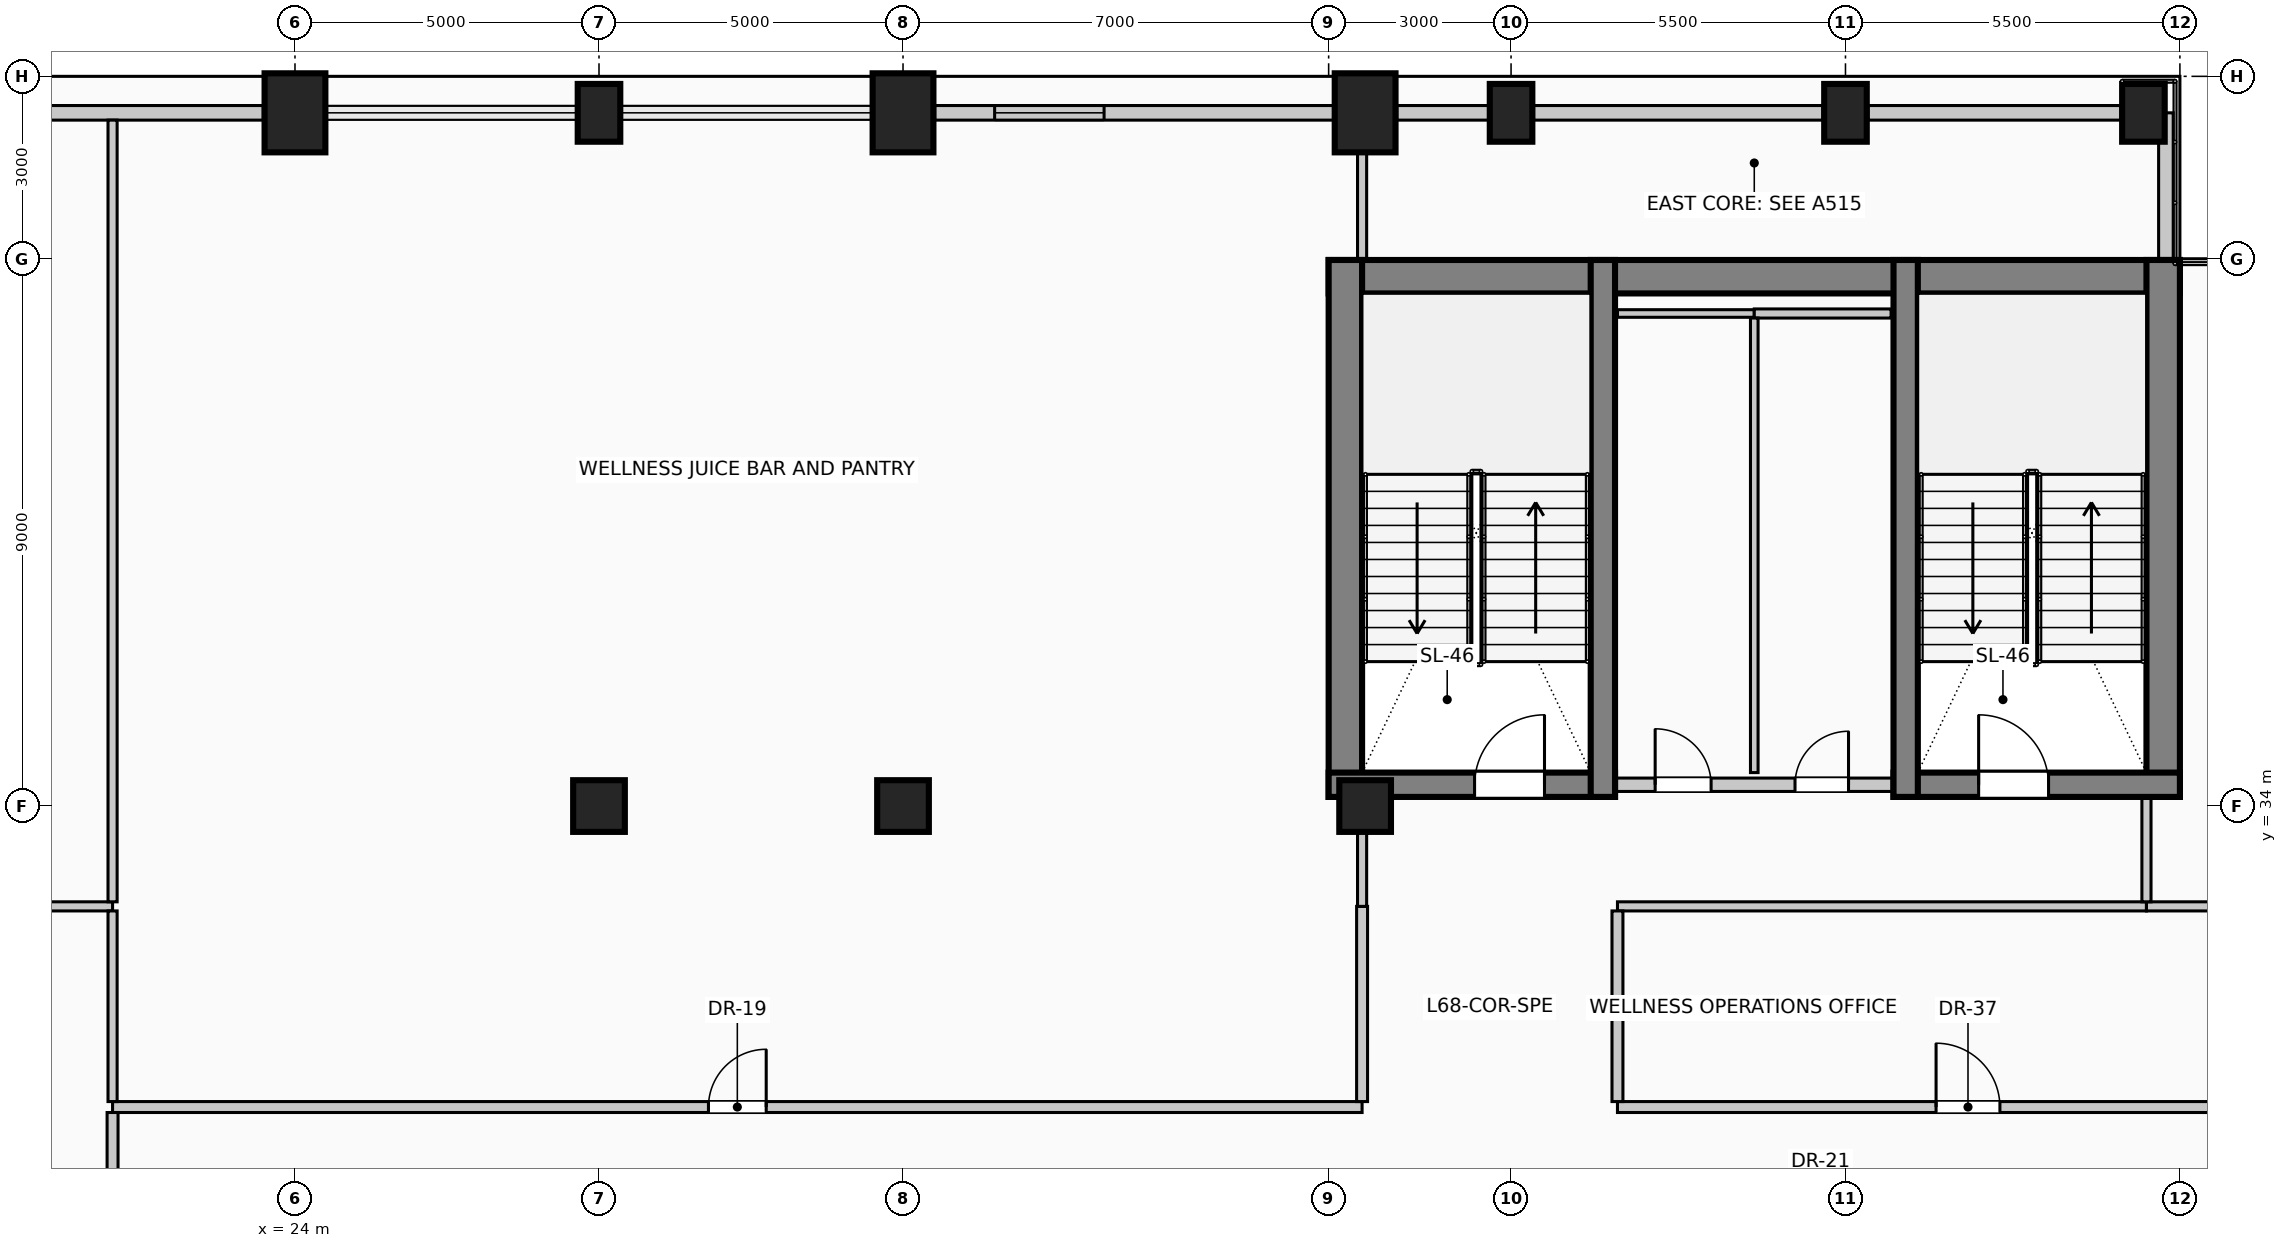
"""IFC4 building model, lengths in metres.
Left out: names, types, materials, properties, quantities, classifications, styles, units other than length and angle.
Written with IfcOpenShell. Run it as: python <this file> out.ifc"""

import sys

from ifc_helpers import new_model, si_unit, direction, frame, frame_2d, origin, origin_2d, place, context, subcontext, project, spatial, rectangle, circle, extrude, element, fill, save


model = new_model("IFC4")
c1 = context("Model", 3, precision=1e-05, world=origin(), true_north=direction((0.0, 1.0)))
c2 = subcontext(c1, "Body", "Model", "MODEL_VIEW")
j1 = project(units=[si_unit("LENGTHUNIT", "METRE"), si_unit("PLANEANGLEUNIT", "RADIAN")], contexts=[c1])
p1 = place(None, origin())
s1 = spatial("IfcSite", under=j1, at=p1, CompositionType="ELEMENT")
p2 = place(p1, origin())
s2 = spatial("IfcBuilding", under=s1, at=p2, CompositionType="ELEMENT")
p3 = place(p2, frame((0.0, 0.0, 280.6)))
s3 = spatial("IfcBuildingStorey", under=s2, at=p3, CompositionType="ELEMENT", Elevation=280.6)
p4 = place(p3, frame((41.0, 42.705, 0.0), z_axis=(0.0, 0.0, 1.0), x_axis=(1.0, 0.0, 0.0)))
e1 = element("IfcWall", 1, at=p4, inside=s3, PredefinedType="SHEAR", context=c2, shape_type="SweptSolid", body=[
    extrude(rectangle(XDim=14.0, YDim=0.55, at=frame_2d((7.0, 0.0))), origin(), (0.0, 0.0, 1.0), 4.4),
])
for number, where, z_axis, x_axis in (
    (2, (41.275, 34.15, 0.0), (0.0, 0.0, 1.0), (0.0, 1.0, 0.0)),
    (3, (54.725, 34.15, 0.0), (0.0, 0.0, 1.0), (0.0, 1.0, 0.0)),
):
    element("IfcWall", number, at=place(p3, frame(where, z_axis=z_axis, x_axis=x_axis)), inside=s3, PredefinedType="SHEAR", context=c2, shape_type="SweptSolid", body=[
        extrude(rectangle(XDim=8.83, YDim=0.55, at=frame_2d((4.415, 0.0))), origin(), (0.0, 0.0, 1.0), 4.4),
    ])
p5 = place(p3, frame((41.0, 34.35, 0.0), z_axis=(0.0, 0.0, 1.0), x_axis=(1.0, 0.0, 0.0)))
e4 = element("IfcWall", 4, at=p5, inside=s3, PredefinedType="SHEAR", context=c2, shape_type="SweptSolid", body=[
    extrude(rectangle(XDim=4.71, YDim=0.4, at=frame_2d((2.355, 0.0))), origin(), (0.0, 0.0, 1.0), 4.4),
])
p6 = place(p5, frame((2.4, 0.0, 0.0)))
e5 = element("IfcOpeningElement", 5, at=p6, cuts=e4, PredefinedType="OPENING", context=c2, shape_type="SweptSolid", body=[
    extrude(rectangle(XDim=1.15, YDim=2.2, at=frame_2d((0.575, 1.1))), frame((0.0, 0.21, 0.0), z_axis=(0.0, -1.0, 0.0), x_axis=(1.0, 0.0, 0.0)), (0.0, 0.0, 1.0), 0.42),
])
p7 = place(p3, frame((45.51, 34.15, 0.0), z_axis=(0.0, 0.0, 1.0), x_axis=(0.0, 1.0, 0.0)))
e6 = element("IfcWall", 6, at=p7, inside=s3, PredefinedType="SHEAR", context=c2, shape_type="SweptSolid", body=[
    extrude(rectangle(XDim=8.83, YDim=0.4, at=frame_2d((4.415, 0.0))), origin(), (0.0, 0.0, 1.0), 4.4),
])
p8 = place(p3, frame((50.29, 34.35, 0.0), z_axis=(0.0, 0.0, 1.0), x_axis=(1.0, 0.0, 0.0)))
e7 = element("IfcWall", 7, at=p8, inside=s3, PredefinedType="SHEAR", context=c2, shape_type="SweptSolid", body=[
    extrude(rectangle(XDim=4.71, YDim=0.4, at=frame_2d((2.355, 0.0))), origin(), (0.0, 0.0, 1.0), 4.4),
])
p9 = place(p8, frame((1.4, 0.0, 0.0)))
e8 = element("IfcOpeningElement", 8, at=p9, cuts=e7, PredefinedType="OPENING", context=c2, shape_type="SweptSolid", body=[
    extrude(rectangle(XDim=1.15, YDim=2.2, at=frame_2d((0.575, 1.1))), frame((0.0, 0.21, 0.0), z_axis=(0.0, -1.0, 0.0), x_axis=(1.0, 0.0, 0.0)), (0.0, 0.0, 1.0), 0.42),
])
p10 = place(p3, frame((50.49, 34.15, 0.0), z_axis=(0.0, 0.0, 1.0), x_axis=(0.0, 1.0, 0.0)))
e9 = element("IfcWall", 9, at=p10, inside=s3, PredefinedType="SHEAR", context=c2, shape_type="SweptSolid", body=[
    extrude(rectangle(XDim=8.83, YDim=0.4, at=frame_2d((4.415, 0.0))), origin(), (0.0, 0.0, 1.0), 4.4),
])
p11 = place(p3, frame((24.0, 45.4, 0.0), z_axis=(0.0, 0.0, 1.0), x_axis=(1.0, 0.0, 0.0)))
e10 = element("IfcColumn", 10, at=p11, inside=s3, PredefinedType="COLUMN", context=c2, shape_type="SweptSolid", body=[
    extrude(rectangle(XDim=1.0, YDim=1.3, at=origin_2d()), origin(), (0.0, 0.0, 1.0), 4.4),
])
p12 = place(p3, frame((29.0, 45.4, 0.0), z_axis=(0.0, 0.0, 1.0), x_axis=(1.0, 0.0, 0.0)))
e11 = element("IfcColumn", 11, at=p12, inside=s3, PredefinedType="COLUMN", context=c2, shape_type="SweptSolid", body=[
    extrude(rectangle(XDim=0.7, YDim=0.95, at=origin_2d()), origin(), (0.0, 0.0, 1.0), 4.4),
])
for number, where, z_axis, x_axis in (
    (12, (34.0, 45.4, 0.0), (0.0, 0.0, 1.0), (1.0, 0.0, 0.0)),
    (13, (41.6, 45.4, 0.0), (0.0, 0.0, 1.0), (1.0, 0.0, 0.0)),
):
    element("IfcColumn", number, at=place(p3, frame(where, z_axis=z_axis, x_axis=x_axis)), inside=s3, PredefinedType="COLUMN", context=c2, shape_type="SweptSolid", body=[
        extrude(rectangle(XDim=1.0, YDim=1.3, at=origin_2d()), origin(), (0.0, 0.0, 1.0), 4.4),
    ])
for number, where, z_axis, x_axis in (
    (14, (44.0, 45.4, 0.0), (0.0, 0.0, 1.0), (1.0, 0.0, 0.0)),
    (15, (49.5, 45.4, 0.0), (0.0, 0.0, 1.0), (1.0, 0.0, 0.0)),
    (16, (54.4, 45.4, 0.0), (0.0, 0.0, 1.0), (1.0, 0.0, 0.0)),
):
    element("IfcColumn", number, at=place(p3, frame(where, z_axis=z_axis, x_axis=x_axis)), inside=s3, PredefinedType="COLUMN", context=c2, shape_type="SweptSolid", body=[
        extrude(rectangle(XDim=0.7, YDim=0.95, at=origin_2d()), origin(), (0.0, 0.0, 1.0), 4.4),
    ])
for number, where, z_axis, x_axis in (
    (17, (29.0, 34.0, 0.0), (0.0, 0.0, 1.0), (1.0, 0.0, 0.0)),
    (18, (41.6, 34.0, 0.0), (0.0, 0.0, 1.0), (1.0, 0.0, 0.0)),
    (19, (34.0, 34.0, 0.0), (0.0, 0.0, 1.0), (1.0, 0.0, 0.0)),
):
    element("IfcColumn", number, at=place(p3, frame(where, z_axis=z_axis, x_axis=x_axis)), inside=s3, PredefinedType="COLUMN", context=c2, shape_type="SweptSolid", body=[
        extrude(circle(Radius=0.425, at=origin_2d()), origin(), (0.0, 0.0, 1.0), 4.4),
    ])
p13 = place(p3, frame((16.92, 45.4, 0.0), z_axis=(0.0, 0.0, 1.0), x_axis=(1.0, 0.0, 0.0)))
e20 = element("IfcWall", 20, at=p13, inside=s3, PredefinedType="SOLIDWALL", context=c2, shape_type="SweptSolid", body=[
    extrude(rectangle(XDim=6.56, YDim=0.24, at=frame_2d((3.28, 0.0))), origin(), (0.0, 0.0, 1.0), 3.4),
])
p14 = place(p13, frame((0.987, 0.0, 0.42)))
e21 = element("IfcOpeningElement", 21, at=p14, cuts=e20, PredefinedType="OPENING", context=c2, shape_type="SweptSolid", body=[
    extrude(rectangle(XDim=1.8, YDim=2.2, at=frame_2d((0.9, 1.1))), frame((0.0, 0.13, 0.0), z_axis=(0.0, -1.0, 0.0), x_axis=(1.0, 0.0, 0.0)), (0.0, 0.0, 1.0), 0.26),
])
p15 = place(p3, frame((34.52, 45.4, 0.0), z_axis=(0.0, 0.0, 1.0), x_axis=(1.0, 0.0, 0.0)))
e22 = element("IfcWall", 22, at=p15, inside=s3, PredefinedType="SOLIDWALL", context=c2, shape_type="SweptSolid", body=[
    extrude(rectangle(XDim=6.56, YDim=0.24, at=frame_2d((3.28, 0.0))), origin(), (0.0, 0.0, 1.0), 3.4),
])
p16 = place(p15, frame((0.987, 0.0, 0.42)))
e23 = element("IfcOpeningElement", 23, at=p16, cuts=e22, PredefinedType="OPENING", context=c2, shape_type="SweptSolid", body=[
    extrude(rectangle(XDim=1.8, YDim=2.2, at=frame_2d((0.9, 1.1))), frame((0.0, 0.13, 0.0), z_axis=(0.0, -1.0, 0.0), x_axis=(1.0, 0.0, 0.0)), (0.0, 0.0, 1.0), 0.26),
])
p17 = place(p3, frame((42.12, 45.4, 0.0), z_axis=(0.0, 0.0, 1.0), x_axis=(1.0, 0.0, 0.0)))
e24 = element("IfcWall", 24, at=p17, inside=s3, PredefinedType="SOLIDWALL", context=c2, shape_type="SweptSolid", body=[
    extrude(rectangle(XDim=1.51, YDim=0.24, at=frame_2d((0.755, 0.0))), origin(), (0.0, 0.0, 1.0), 3.4),
])
p18 = place(p3, frame((44.37, 45.4, 0.0), z_axis=(0.0, 0.0, 1.0), x_axis=(1.0, 0.0, 0.0)))
e25 = element("IfcWall", 25, at=p18, inside=s3, PredefinedType="SOLIDWALL", context=c2, shape_type="SweptSolid", body=[
    extrude(rectangle(XDim=4.76, YDim=0.24, at=frame_2d((2.38, 0.0))), origin(), (0.0, 0.0, 1.0), 3.4),
])
p19 = place(p3, frame((49.87, 45.4, 0.0), z_axis=(0.0, 0.0, 1.0), x_axis=(1.0, 0.0, 0.0)))
e26 = element("IfcWall", 26, at=p19, inside=s3, PredefinedType="SOLIDWALL", context=c2, shape_type="SweptSolid", body=[
    extrude(rectangle(XDim=4.16, YDim=0.24, at=frame_2d((2.08, 0.0))), origin(), (0.0, 0.0, 1.0), 3.4),
])
p20 = place(p3, frame((54.77, 45.4, 0.0), z_axis=(0.0, 0.0, 1.0), x_axis=(0.0, -1.0, 0.0)))
e27 = element("IfcWall", 27, at=p20, inside=s3, PredefinedType="SOLIDWALL", context=c2, shape_type="SweptSolid", body=[
    extrude(rectangle(XDim=2.415, YDim=0.24, at=frame_2d((1.208, 0.0))), origin(), (0.0, 0.0, 1.0), 4.15),
])
p21 = place(p3, frame((45.72, 34.35, 0.0), z_axis=(0.0, 0.0, 1.0), x_axis=(1.0, 0.0, 0.0)))
e28 = element("IfcWall", 28, at=p21, inside=s3, PredefinedType="PARTITIONING", context=c2, shape_type="SweptSolid", body=[
    extrude(rectangle(XDim=4.56, YDim=0.22, at=frame_2d((2.28, 0.0))), origin(), (0.0, 0.0, 1.0), 4.15),
])
p22 = place(p21, frame((0.65, 0.0, 0.0)))
e29 = element("IfcOpeningElement", 29, at=p22, cuts=e28, PredefinedType="OPENING", context=c2, shape_type="SweptSolid", body=[
    extrude(rectangle(XDim=0.92, YDim=2.1, at=frame_2d((0.46, 1.05))), frame((0.0, 0.12, 0.0), z_axis=(0.0, -1.0, 0.0), x_axis=(1.0, 0.0, 0.0)), (0.0, 0.0, 1.0), 0.24),
])
p23 = place(p21, frame((2.95, 0.0, 0.0)))
e30 = element("IfcOpeningElement", 30, at=p23, cuts=e28, PredefinedType="OPENING", context=c2, shape_type="SweptSolid", body=[
    extrude(rectangle(XDim=0.88, YDim=2.1, at=frame_2d((0.44, 1.05))), frame((0.0, 0.12, 0.0), z_axis=(0.0, -1.0, 0.0), x_axis=(1.0, 0.0, 0.0)), (0.0, 0.0, 1.0), 0.24),
])
p24 = place(p3, frame((21.0, 29.05, 0.0), z_axis=(0.0, 0.0, 1.0), x_axis=(1.0, 0.0, 0.0)))
e31 = element("IfcWall", 31, at=p24, inside=s3, PredefinedType="PARTITIONING", context=c2, shape_type="SweptSolid", body=[
    extrude(rectangle(XDim=20.55, YDim=0.18, at=frame_2d((10.275, 0.0))), origin(), (0.0, 0.0, 1.0), 4.15),
])
p25 = place(p24, frame((9.8, 0.0, 0.0)))
e32 = element("IfcOpeningElement", 32, at=p25, cuts=e31, PredefinedType="OPENING", context=c2, shape_type="SweptSolid", body=[
    extrude(rectangle(XDim=0.95, YDim=2.15, at=frame_2d((0.475, 1.075))), frame((0.0, 0.1, 0.0), z_axis=(0.0, -1.0, 0.0), x_axis=(1.0, 0.0, 0.0)), (0.0, 0.0, 1.0), 0.2),
])
p26 = place(p3, frame((45.75, 29.05, 0.0), z_axis=(0.0, 0.0, 1.0), x_axis=(1.0, 0.0, 0.0)))
e33 = element("IfcWall", 33, at=p26, inside=s3, PredefinedType="PARTITIONING", context=c2, shape_type="SweptSolid", body=[
    extrude(rectangle(XDim=11.53, YDim=0.18, at=frame_2d((5.765, 0.0))), origin(), (0.0, 0.0, 1.0), 4.15),
])
p27 = place(p26, frame((5.24, 0.0, 0.0)))
e34 = element("IfcOpeningElement", 34, at=p27, cuts=e33, PredefinedType="OPENING", context=c2, shape_type="SweptSolid", body=[
    extrude(rectangle(XDim=1.05, YDim=2.15, at=frame_2d((0.525, 1.075))), frame((0.0, 0.1, 0.0), z_axis=(0.0, -1.0, 0.0), x_axis=(1.0, 0.0, 0.0)), (0.0, 0.0, 1.0), 0.2),
])
p28 = place(p3, frame((15.85, 32.35, 0.0), z_axis=(0.0, 0.0, 1.0), x_axis=(1.0, 0.0, 0.0)))
e35 = element("IfcWall", 35, at=p28, inside=s3, PredefinedType="PARTITIONING", context=c2, shape_type="SweptSolid", body=[
    extrude(rectangle(XDim=5.15, YDim=0.15, at=frame_2d((2.575, 0.0))), origin(), (0.0, 0.0, 1.0), 4.15),
])
p29 = place(p3, frame((45.75, 32.35, 0.0), z_axis=(0.0, 0.0, 1.0), x_axis=(1.0, 0.0, 0.0)))
e36 = element("IfcWall", 36, at=p29, inside=s3, PredefinedType="PARTITIONING", context=c2, shape_type="SweptSolid", body=[
    extrude(rectangle(XDim=8.7, YDim=0.15, at=frame_2d((4.35, 0.0))), origin(), (0.0, 0.0, 1.0), 4.15),
])
p30 = place(p3, frame((54.45, 32.35, 0.0), z_axis=(0.0, 0.0, 1.0), x_axis=(1.0, 0.0, 0.0)))
e37 = element("IfcWall", 37, at=p30, inside=s3, PredefinedType="PARTITIONING", context=c2, shape_type="SweptSolid", body=[
    extrude(rectangle(XDim=2.83, YDim=0.15, at=frame_2d((1.415, 0.0))), origin(), (0.0, 0.0, 1.0), 4.15),
])
p31 = place(p3, frame((45.75, 42.1, 0.0), z_axis=(0.0, 0.0, 1.0), x_axis=(1.0, 0.0, 0.0)))
e38 = element("IfcWall", 38, at=p31, inside=s3, PredefinedType="PARTITIONING", context=c2, shape_type="SweptSolid", body=[
    extrude(rectangle(XDim=2.25, YDim=0.125, at=frame_2d((1.125, 0.0))), origin(), (0.0, 0.0, 1.0), 4.15),
])
p32 = place(p3, frame((48.0, 42.1, 0.0), z_axis=(0.0, 0.0, 1.0), x_axis=(1.0, 0.0, 0.0)))
e39 = element("IfcWall", 39, at=p32, inside=s3, PredefinedType="PARTITIONING", context=c2, shape_type="SweptSolid", body=[
    extrude(rectangle(XDim=2.25, YDim=0.15, at=frame_2d((1.125, 0.0))), origin(), (0.0, 0.0, 1.0), 4.15),
])
p33 = place(p3, frame((21.0, 26.9, 0.0), z_axis=(0.0, 0.0, 1.0), x_axis=(0.0, 1.0, 0.0)))
e40 = element("IfcWall", 40, at=p33, inside=s3, PredefinedType="PARTITIONING", context=c2, shape_type="SweptSolid", body=[
    extrude(rectangle(XDim=2.06, YDim=0.18, at=frame_2d((1.03, 0.0))), origin(), (0.0, 0.0, 1.0), 4.15),
])
p34 = place(p3, frame((21.0, 29.14, 0.0), z_axis=(0.0, 0.0, 1.0), x_axis=(0.0, 1.0, 0.0)))
e41 = element("IfcWall", 41, at=p34, inside=s3, PredefinedType="PARTITIONING", context=c2, shape_type="SweptSolid", body=[
    extrude(rectangle(XDim=3.135, YDim=0.15, at=frame_2d((1.567, 0.0))), origin(), (0.0, 0.0, 1.0), 4.15),
])
p35 = place(p3, frame((21.0, 32.425, 0.0), z_axis=(0.0, 0.0, 1.0), x_axis=(0.0, 1.0, 0.0)))
e42 = element("IfcWall", 42, at=p35, inside=s3, PredefinedType="PARTITIONING", context=c2, shape_type="SweptSolid", body=[
    extrude(rectangle(XDim=12.855, YDim=0.15, at=frame_2d((6.427, 0.0))), origin(), (0.0, 0.0, 1.0), 4.15),
])
p36 = place(p3, frame((41.55, 29.14, 0.0), z_axis=(0.0, 0.0, 1.0), x_axis=(0.0, 1.0, 0.0)))
e43 = element("IfcWall", 43, at=p36, inside=s3, PredefinedType="PARTITIONING", context=c2, shape_type="SweptSolid", body=[
    extrude(rectangle(XDim=3.21, YDim=0.18, at=frame_2d((1.605, 0.0))), origin(), (0.0, 0.0, 1.0), 3.595),
])
p37 = place(p3, frame((41.55, 32.35, 0.0), z_axis=(0.0, 0.0, 1.0), x_axis=(0.0, 1.0, 0.0)))
e44 = element("IfcWall", 44, at=p37, inside=s3, PredefinedType="PARTITIONING", context=c2, shape_type="SweptSolid", body=[
    extrude(rectangle(XDim=1.225, YDim=0.15, at=frame_2d((0.612, 0.0))), origin(), (0.0, 0.0, 1.0), 3.595),
])
p38 = place(p3, frame((41.55, 42.98, 0.0), z_axis=(0.0, 0.0, 1.0), x_axis=(0.0, 1.0, 0.0)))
e45 = element("IfcWall", 45, at=p38, inside=s3, PredefinedType="PARTITIONING", context=c2, shape_type="SweptSolid", body=[
    extrude(rectangle(XDim=1.77, YDim=0.15, at=frame_2d((0.885, 0.0))), origin(), (0.0, 0.0, 1.0), 4.15),
])
p39 = place(p3, frame((45.75, 29.14, 0.0), z_axis=(0.0, 0.0, 1.0), x_axis=(0.0, 1.0, 0.0)))
e46 = element("IfcWall", 46, at=p39, inside=s3, PredefinedType="PARTITIONING", context=c2, shape_type="SweptSolid", body=[
    extrude(rectangle(XDim=3.135, YDim=0.18, at=frame_2d((1.567, 0.0))), origin(), (0.0, 0.0, 1.0), 4.15),
])
p40 = place(p3, frame((48.0, 34.55, 0.0), z_axis=(0.0, 0.0, 1.0), x_axis=(0.0, 1.0, 0.0)))
e47 = element("IfcWall", 47, at=p40, inside=s3, PredefinedType="PARTITIONING", context=c2, shape_type="SweptSolid", body=[
    extrude(rectangle(XDim=7.475, YDim=0.125, at=frame_2d((3.737, 0.0))), origin(), (0.0, 0.0, 1.0), 4.15),
])
p41 = place(p3, frame((54.45, 32.425, 0.0), z_axis=(0.0, 0.0, 1.0), x_axis=(0.0, 1.0, 0.0)))
e48 = element("IfcWall", 48, at=p41, inside=s3, PredefinedType="PARTITIONING", context=c2, shape_type="SweptSolid", body=[
    extrude(rectangle(XDim=1.725, YDim=0.15, at=frame_2d((0.862, 0.0))), origin(), (0.0, 0.0, 1.0), 4.15),
])
p42 = place(p16, origin())
e49 = element("IfcWindow", 49, at=p42, inside=s3, PartitioningType="SINGLE_PANEL", PredefinedType="WINDOW", context=c2, shape_type="SweptSolid", body=[
    extrude(rectangle(XDim=1.8, YDim=2.2, at=frame_2d((0.9, 1.1))), frame((0.0, 0.03, 0.0), z_axis=(0.0, -1.0, 0.0), x_axis=(1.0, 0.0, 0.0)), (0.0, 0.0, 1.0), 0.06),
])
fill(e23, e49)
p43 = place(p6, origin())
e50 = element("IfcDoor", 50, at=p43, inside=s3, OperationType="SINGLE_SWING_RIGHT", PredefinedType="DOOR", context=c2, shape_type="SweptSolid", body=[
    extrude(rectangle(XDim=1.15, YDim=2.2, at=frame_2d((0.575, 1.1))), frame((0.0, 0.025, 0.0), z_axis=(0.0, -1.0, 0.0), x_axis=(1.0, 0.0, 0.0)), (0.0, 0.0, 1.0), 0.05),
])
fill(e5, e50)
p44 = place(p22, origin())
e51 = element("IfcDoor", 51, at=p44, inside=s3, OperationType="SINGLE_SWING_LEFT", PredefinedType="DOOR", context=c2, shape_type="SweptSolid", body=[
    extrude(rectangle(XDim=0.92, YDim=2.1, at=frame_2d((0.46, 1.05))), frame((0.0, 0.025, 0.0), z_axis=(0.0, -1.0, 0.0), x_axis=(1.0, 0.0, 0.0)), (0.0, 0.0, 1.0), 0.05),
])
fill(e29, e51)
p45 = place(p23, origin())
e52 = element("IfcDoor", 52, at=p45, inside=s3, OperationType="SINGLE_SWING_RIGHT", PredefinedType="DOOR", context=c2, shape_type="SweptSolid", body=[
    extrude(rectangle(XDim=0.88, YDim=2.1, at=frame_2d((0.44, 1.05))), frame((0.0, 0.025, 0.0), z_axis=(0.0, -1.0, 0.0), x_axis=(1.0, 0.0, 0.0)), (0.0, 0.0, 1.0), 0.05),
])
fill(e30, e52)
p46 = place(p9, origin())
e53 = element("IfcDoor", 53, at=p46, inside=s3, OperationType="SINGLE_SWING_LEFT", PredefinedType="DOOR", context=c2, shape_type="SweptSolid", body=[
    extrude(rectangle(XDim=1.15, YDim=2.2, at=frame_2d((0.575, 1.1))), frame((0.0, 0.025, 0.0), z_axis=(0.0, -1.0, 0.0), x_axis=(1.0, 0.0, 0.0)), (0.0, 0.0, 1.0), 0.05),
])
fill(e8, e53)
p47 = place(p25, origin())
e54 = element("IfcDoor", 54, at=p47, inside=s3, OperationType="SINGLE_SWING_RIGHT", PredefinedType="DOOR", context=c2, shape_type="SweptSolid", body=[
    extrude(rectangle(XDim=0.95, YDim=2.15, at=frame_2d((0.475, 1.075))), frame((0.0, 0.025, 0.0), z_axis=(0.0, -1.0, 0.0), x_axis=(1.0, 0.0, 0.0)), (0.0, 0.0, 1.0), 0.05),
])
fill(e32, e54)
p48 = place(p27, origin())
e55 = element("IfcDoor", 55, at=p48, inside=s3, OperationType="SINGLE_SWING_LEFT", PredefinedType="DOOR", context=c2, shape_type="SweptSolid", body=[
    extrude(rectangle(XDim=1.05, YDim=2.15, at=frame_2d((0.525, 1.075))), frame((0.0, 0.025, 0.0), z_axis=(0.0, -1.0, 0.0), x_axis=(1.0, 0.0, 0.0)), (0.0, 0.0, 1.0), 0.05),
])
fill(e34, e55)
save(model, sys.argv[1])
